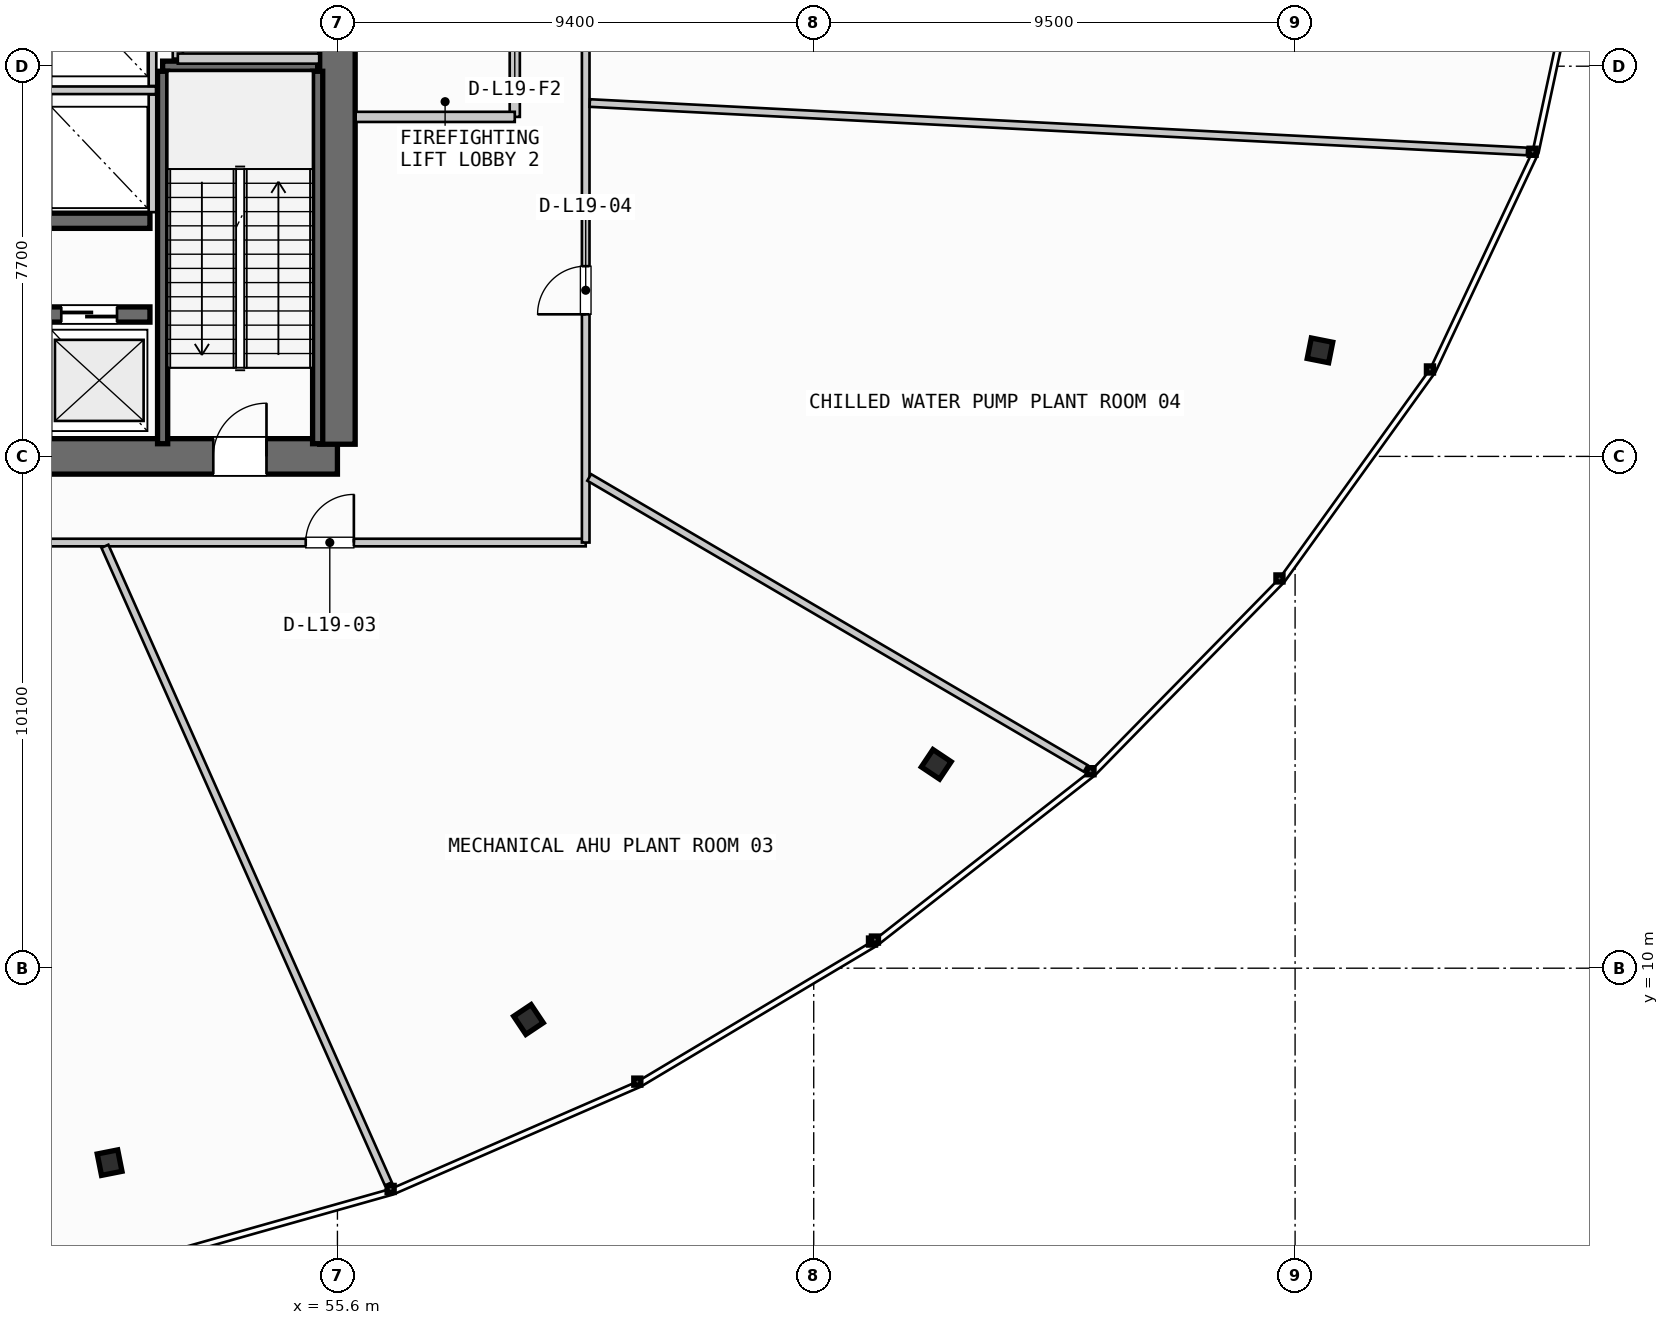
"""IFC4 building model, lengths in metres.
Left out: names, types, materials, properties, quantities, classifications, styles, units other than length and angle.
Written with IfcOpenShell. Run it as: python <this file> out.ifc"""

import sys

from ifc_helpers import new_model, si_unit, direction, frame, frame_2d, origin, origin_2d, place, context, subcontext, project, spatial, rectangle, i_section, extrude, source, transform, mapped, element, fill, save


model = new_model("IFC4")
c1 = context("Model", 3, precision=1e-05, world=origin(), true_north=direction((0.0, 1.0)))
c2 = subcontext(c1, "Body", "Model", "MODEL_VIEW")
j1 = project(units=[si_unit("LENGTHUNIT", "METRE"), si_unit("PLANEANGLEUNIT", "RADIAN")], contexts=[c1])
p1 = place(None, origin())
s1 = spatial("IfcSite", under=j1, at=p1, CompositionType="ELEMENT")
p2 = place(p1, origin())
s2 = spatial("IfcBuilding", under=s1, at=p2, CompositionType="ELEMENT")
p3 = place(p2, frame((0.0, 0.0, 80.4)))
s3 = spatial("IfcBuildingStorey", under=s2, at=p3, CompositionType="ELEMENT", Elevation=80.4)
p4 = place(p3, frame((38.0, 20.1, 0.0), z_axis=(0.0, 0.0, 1.0), x_axis=(1.0, 0.0, 0.0)))
e1 = element("IfcWall", 1, at=p4, inside=s3, PredefinedType="SHEAR", context=c2, shape_type="SweptSolid", body=[
    extrude(rectangle(XDim=17.6, YDim=0.7, at=frame_2d((8.8, 0.0))), origin(), (0.0, 0.0, 1.0), 4.76),
])
p5 = place(p4, frame((1.4, 0.0, 0.0)))
e2 = element("IfcOpeningElement", 2, at=p5, cuts=e1, PredefinedType="OPENING", context=c2, shape_type="SweptSolid", body=[
    extrude(rectangle(XDim=1.05, YDim=2.15, at=frame_2d((0.525, 1.075))), frame((0.0, 0.36, 0.0), z_axis=(0.0, -1.0, 0.0), x_axis=(1.0, 0.0, 0.0)), (0.0, 0.0, 1.0), 0.72),
])
p6 = place(p4, frame((15.15, 0.0, 0.0)))
e3 = element("IfcOpeningElement", 3, at=p6, cuts=e1, PredefinedType="OPENING", context=c2, shape_type="SweptSolid", body=[
    extrude(rectangle(XDim=1.05, YDim=2.15, at=frame_2d((0.525, 1.075))), frame((0.0, 0.36, 0.0), z_axis=(0.0, -1.0, 0.0), x_axis=(1.0, 0.0, 0.0)), (0.0, 0.0, 1.0), 0.72),
])
p7 = place(p3, frame((55.6, 20.34, 0.0), z_axis=(0.0, 0.0, 1.0), x_axis=(0.0, 1.0, 0.0)))
e4 = element("IfcWall", 4, at=p7, inside=s3, PredefinedType="SHEAR", context=c2, shape_type="SweptSolid", body=[
    extrude(rectangle(XDim=14.92, YDim=0.7, at=frame_2d((7.46, 0.0))), origin(), (0.0, 0.0, 1.0), 4.76),
])
p8 = place(p7, frame((12.71, 0.0, 0.0)))
e5 = element("IfcOpeningElement", 5, at=p8, cuts=e4, PredefinedType="OPENING", context=c2, shape_type="SweptSolid", body=[
    extrude(rectangle(XDim=1.05, YDim=2.15, at=frame_2d((0.525, 1.075))), frame((0.0, 0.36, 0.0), z_axis=(0.0, -1.0, 0.0), x_axis=(1.0, 0.0, 0.0)), (0.0, 0.0, 1.0), 0.72),
])
p9 = place(p7, frame((8.61, 0.0, 0.0)))
e6 = element("IfcOpeningElement", 6, at=p9, cuts=e4, PredefinedType="OPENING", context=c2, shape_type="SweptSolid", body=[
    extrude(rectangle(XDim=1.1, YDim=2.2, at=frame_2d((0.55, 1.1))), frame((0.0, 0.36, 0.0), z_axis=(0.0, -1.0, 0.0), x_axis=(1.0, 0.0, 0.0)), (0.0, 0.0, 1.0), 0.72),
])
p10 = place(p3, frame((47.65, 22.9, 0.0), z_axis=(0.0, 0.0, 1.0), x_axis=(1.0, 0.0, 0.0)))
e7 = element("IfcWall", 7, at=p10, inside=s3, PredefinedType="SHEAR", context=c2, shape_type="SweptSolid", body=[
    extrude(rectangle(XDim=4.25, YDim=0.3, at=frame_2d((2.125, 0.0))), origin(), (0.0, 0.0, 1.0), 4.76),
])
p11 = place(p10, frame((0.45, 0.0, 0.0)))
e8 = element("IfcOpeningElement", 8, at=p11, cuts=e7, PredefinedType="OPENING", context=c2, shape_type="SweptSolid", body=[
    extrude(rectangle(XDim=1.1, YDim=2.2, at=frame_2d((0.55, 1.1))), frame((0.0, 0.16, 0.0), z_axis=(0.0, -1.0, 0.0), x_axis=(1.0, 0.0, 0.0)), (0.0, 0.0, 1.0), 0.32),
])
p12 = place(p10, frame((2.5, 0.0, 0.0)))
e9 = element("IfcOpeningElement", 9, at=p12, cuts=e7, PredefinedType="OPENING", context=c2, shape_type="SweptSolid", body=[
    extrude(rectangle(XDim=1.1, YDim=2.2, at=frame_2d((0.55, 1.1))), frame((0.0, 0.16, 0.0), z_axis=(0.0, -1.0, 0.0), x_axis=(1.0, 0.0, 0.0)), (0.0, 0.0, 1.0), 0.32),
])
p13 = place(p3, frame((47.65, 24.75, 0.0), z_axis=(0.0, 0.0, 1.0), x_axis=(1.0, 0.0, 0.0)))
e10 = element("IfcWall", 10, at=p13, inside=s3, PredefinedType="SHEAR", context=c2, shape_type="SweptSolid", body=[
    extrude(rectangle(XDim=4.25, YDim=0.3, at=frame_2d((2.125, 0.0))), origin(), (0.0, 0.0, 1.0), 4.76),
])
m1 = source(origin(), c2, "Body", "SweptSolid", [
    extrude(i_section(OverallWidth=0.412, OverallDepth=0.431, WebThickness=0.042, FlangeThickness=0.068, FilletRadius=0.015, at=origin_2d()), origin(), (0.0, 0.0, 1.0), 4.76),
])
for number, where, z_axis, x_axis in (
    (11, (51.104, 6.163, 0.0), (0.0, 0.0, 1.0), (0.195, -0.981, 0.0)),
    (12, (59.37, 8.987, 0.0), (0.0, 0.0, 1.0), (0.556, -0.831, 0.0)),
    (13, (67.418, 14.023, 0.0), (0.0, 0.0, 1.0), (0.831, -0.556, 0.0)),
    (14, (74.991, 22.192, 0.0), (0.0, 0.0, 1.0), (0.981, -0.195, 0.0)),
):
    element("IfcColumn", number, at=place(p3, frame(where, z_axis=z_axis, x_axis=x_axis)), inside=s3, PredefinedType="COLUMN", context=c2, shape_type="MappedRepresentation", body=[
        mapped(m1, transform((0.0, 0.0, 0.0), scale=1.0)),
    ])
p14 = place(p3, frame((52.15, 27.8, 0.0), z_axis=(0.0, 0.0, 1.0), x_axis=(1.0, 0.0, 0.0)))
e15 = element("IfcWall", 15, at=p14, inside=s3, PredefinedType="SHEAR", context=c2, shape_type="SweptSolid", body=[
    extrude(rectangle(XDim=3.06, YDim=0.2, at=frame_2d((1.53, 0.0))), origin(), (0.0, 0.0, 1.0), 4.76),
])
for number, where, z_axis, x_axis in (
    (16, (55.21, 27.7, 0.0), (0.0, 0.0, 1.0), (0.0, -1.0, 0.0)),
    (17, (52.15, 20.35, 0.0), (0.0, 0.0, 1.0), (0.0, 1.0, 0.0)),
):
    element("IfcWall", number, at=place(p3, frame(where, z_axis=z_axis, x_axis=x_axis)), inside=s3, PredefinedType="SHEAR", context=c2, shape_type="SweptSolid", body=[
        extrude(rectangle(XDim=7.35, YDim=0.2, at=frame_2d((3.675, 0.0))), origin(), (0.0, 0.0, 1.0), 4.76),
    ])
p15 = place(p3, frame((52.45, 27.95, 0.0), z_axis=(0.0, 0.0, 1.0), x_axis=(0.0, 1.0, 0.0)))
e18 = element("IfcWall", 18, at=p15, inside=s3, PredefinedType="PARTITIONING", context=c2, shape_type="SweptSolid", body=[
    extrude(rectangle(XDim=3.1, YDim=0.2, at=frame_2d((1.55, 0.0))), origin(), (0.0, 0.0, 1.0), 2.335),
])
p16 = place(p3, frame((52.45, 27.95, 0.0), z_axis=(0.0, 0.0, 1.0), x_axis=(1.0, 0.0, 0.0)))
e19 = element("IfcWall", 19, at=p16, inside=s3, PredefinedType="PARTITIONING", context=c2, shape_type="SweptSolid", body=[
    extrude(rectangle(XDim=2.79, YDim=0.2, at=frame_2d((1.395, 0.0))), origin(), (0.0, 0.0, 1.0), 2.335),
])
p17 = place(p3, frame((59.1, 26.8, 0.0), z_axis=(0.0, 0.0, 1.0), x_axis=(0.0, 1.0, 0.0)))
e20 = element("IfcWall", 20, at=p17, inside=s3, PredefinedType="PARTITIONING", context=c2, shape_type="SweptSolid", body=[
    extrude(rectangle(XDim=4.4, YDim=0.2, at=frame_2d((2.2, 0.0))), origin(), (0.0, 0.0, 1.0), 2.335),
])
p18 = place(p17, frame((1.65, 0.0, 0.0)))
e21 = element("IfcOpeningElement", 21, at=p18, cuts=e20, PredefinedType="OPENING", context=c2, shape_type="SweptSolid", body=[
    extrude(rectangle(XDim=1.05, YDim=2.15, at=frame_2d((0.525, 1.075))), frame((0.0, 0.11, 0.0), z_axis=(0.0, -1.0, 0.0), x_axis=(1.0, 0.0, 0.0)), (0.0, 0.0, 1.0), 0.22),
])
p19 = place(p3, frame((55.96, 26.8, 0.0), z_axis=(0.0, 0.0, 1.0), x_axis=(1.0, 0.0, 0.0)))
e22 = element("IfcWall", 22, at=p19, inside=s3, PredefinedType="PARTITIONING", context=c2, shape_type="SweptSolid", body=[
    extrude(rectangle(XDim=3.14, YDim=0.2, at=frame_2d((1.57, 0.0))), origin(), (0.0, 0.0, 1.0), 2.335),
])
p20 = place(p3, frame((47.7, 27.325, 0.0), z_axis=(0.0, 0.0, 1.0), x_axis=(1.0, 0.0, 0.0)))
e23 = element("IfcWall", 23, at=p20, inside=s3, PredefinedType="PARTITIONING", context=c2, shape_type="SweptSolid", body=[
    extrude(rectangle(XDim=4.32, YDim=0.15, at=frame_2d((2.16, 0.0))), origin(), (0.0, 0.0, 1.0), 2.335),
])
p21 = place(p3, frame((51.95, 24.92, 0.0), z_axis=(0.0, 0.0, 1.0), x_axis=(0.0, 1.0, 0.0)))
e24 = element("IfcWall", 24, at=p21, inside=s3, PredefinedType="PARTITIONING", context=c2, shape_type="SweptSolid", body=[
    extrude(rectangle(XDim=2.32, YDim=0.15, at=frame_2d((1.16, 0.0))), origin(), (0.0, 0.0, 1.0), 2.335),
])
p22 = place(p3, frame((51.95, 27.41, 0.0), z_axis=(0.0, 0.0, 1.0), x_axis=(0.0, 1.0, 0.0)))
e25 = element("IfcWall", 25, at=p22, inside=s3, PredefinedType="PARTITIONING", context=c2, shape_type="SweptSolid", body=[
    extrude(rectangle(XDim=2.27, YDim=0.15, at=frame_2d((1.135, 0.0))), origin(), (0.0, 0.0, 1.0), 2.335),
])
p23 = place(p3, frame((33.1, 18.4, 0.0), z_axis=(0.0, 0.0, 1.0), x_axis=(1.0, 0.0, 0.0)))
e26 = element("IfcWall", 26, at=p23, inside=s3, PredefinedType="PARTITIONING", context=c2, shape_type="SweptSolid", body=[
    extrude(rectangle(XDim=27.4, YDim=0.15, at=frame_2d((13.7, 0.0))), origin(), (0.0, 0.0, 1.0), 2.335),
])
p24 = place(p23, frame((2.398, 0.0, 0.0)))
e27 = element("IfcOpeningElement", 27, at=p24, cuts=e26, PredefinedType="OPENING", context=c2, shape_type="SweptSolid", body=[
    extrude(rectangle(XDim=0.95, YDim=2.15, at=frame_2d((0.475, 1.075))), frame((0.0, 0.085, 0.0), z_axis=(0.0, -1.0, 0.0), x_axis=(1.0, 0.0, 0.0)), (0.0, 0.0, 1.0), 0.17),
])
p25 = place(p23, frame((10.77, 0.0, 0.0)))
e28 = element("IfcOpeningElement", 28, at=p25, cuts=e26, PredefinedType="OPENING", context=c2, shape_type="SweptSolid", body=[
    extrude(rectangle(XDim=0.95, YDim=2.15, at=frame_2d((0.475, 1.075))), frame((0.0, 0.085, 0.0), z_axis=(0.0, -1.0, 0.0), x_axis=(1.0, 0.0, 0.0)), (0.0, 0.0, 1.0), 0.17),
])
p26 = place(p23, frame((21.875, 0.0, 0.0)))
e29 = element("IfcOpeningElement", 29, at=p26, cuts=e26, PredefinedType="OPENING", context=c2, shape_type="SweptSolid", body=[
    extrude(rectangle(XDim=0.95, YDim=2.15, at=frame_2d((0.475, 1.075))), frame((0.0, 0.085, 0.0), z_axis=(0.0, -1.0, 0.0), x_axis=(1.0, 0.0, 0.0)), (0.0, 0.0, 1.0), 0.17),
])
p27 = place(p3, frame((60.5, 18.4, 0.0), z_axis=(0.0, 0.0, 1.0), x_axis=(0.0, 1.0, 0.0)))
e30 = element("IfcWall", 30, at=p27, inside=s3, PredefinedType="PARTITIONING", context=c2, shape_type="SweptSolid", body=[
    extrude(rectangle(XDim=18.8, YDim=0.15, at=frame_2d((9.4, 0.0))), origin(), (0.0, 0.0, 1.0), 2.335),
])
p28 = place(p27, frame((4.504, 0.0, 0.0)))
e31 = element("IfcOpeningElement", 31, at=p28, cuts=e30, PredefinedType="OPENING", context=c2, shape_type="SweptSolid", body=[
    extrude(rectangle(XDim=0.95, YDim=2.15, at=frame_2d((0.475, 1.075))), frame((0.0, 0.085, 0.0), z_axis=(0.0, -1.0, 0.0), x_axis=(1.0, 0.0, 0.0)), (0.0, 0.0, 1.0), 0.17),
])
p29 = place(p27, frame((11.983, 0.0, 0.0)))
e32 = element("IfcOpeningElement", 32, at=p29, cuts=e30, PredefinedType="OPENING", context=c2, shape_type="SweptSolid", body=[
    extrude(rectangle(XDim=0.95, YDim=2.15, at=frame_2d((0.475, 1.075))), frame((0.0, 0.085, 0.0), z_axis=(0.0, -1.0, 0.0), x_axis=(1.0, 0.0, 0.0)), (0.0, 0.0, 1.0), 0.17),
])
p30 = place(p3, frame((51.011, 18.327, 0.0), z_axis=(0.0, 0.0, 1.0), x_axis=(0.406247031728, -0.913763289486, 0.0)))
e33 = element("IfcWall", 33, at=p30, inside=s3, PredefinedType="PARTITIONING", context=c2, shape_type="SweptSolid", body=[
    extrude(rectangle(XDim=13.771, YDim=0.15, at=frame_2d((6.885, 0.0))), origin(), (0.0, 0.0, 1.0), 2.335),
])
p31 = place(p3, frame((60.569, 19.685, 0.0), z_axis=(0.0, 0.0, 1.0), x_axis=(0.862760384017, -0.505613013847, 0.0)))
e34 = element("IfcWall", 34, at=p31, inside=s3, PredefinedType="PARTITIONING", context=c2, shape_type="SweptSolid", body=[
    extrude(rectangle(XDim=11.356, YDim=0.15, at=frame_2d((5.678, 0.0))), origin(), (0.0, 0.0, 1.0), 2.335),
])
p32 = place(p3, frame((60.58, 27.073, 0.0), z_axis=(0.0, 0.0, 1.0), x_axis=(0.998666262496, -0.051630380125, 0.0)))
e35 = element("IfcWall", 35, at=p32, inside=s3, PredefinedType="PARTITIONING", context=c2, shape_type="SweptSolid", body=[
    extrude(rectangle(XDim=18.522, YDim=0.15, at=frame_2d((9.261, 0.0))), origin(), (0.0, 0.0, 1.0), 2.335),
])
m2 = source(origin(), c2, "Body", "SweptSolid", [
    extrude(rectangle(XDim=1.05, YDim=2.15, at=frame_2d((0.525, 1.075))), frame((0.0, 0.025, 0.0), z_axis=(0.0, -1.0, 0.0), x_axis=(1.0, 0.0, 0.0)), (0.0, 0.0, 1.0), 0.05),
])
p33 = place(p6, origin())
e36 = element("IfcDoor", 36, at=p33, inside=s3, OperationType="SINGLE_SWING_RIGHT", PredefinedType="DOOR", context=c2, shape_type="MappedRepresentation", body=[
    mapped(m2, transform((0.0, 0.0, 0.0), scale=1.0)),
])
fill(e3, e36)
m3 = source(origin(), c2, "Body", "SweptSolid", [
    extrude(rectangle(XDim=1.1, YDim=2.2, at=frame_2d((0.55, 1.1))), frame((0.0, 0.025, 0.0), z_axis=(0.0, -1.0, 0.0), x_axis=(1.0, 0.0, 0.0)), (0.0, 0.0, 1.0), 0.05),
])
p34 = place(p12, origin())
e37 = element("IfcDoor", 37, at=p34, inside=s3, OperationType="SLIDING_TO_LEFT", PredefinedType="DOOR", context=c2, shape_type="MappedRepresentation", body=[
    mapped(m3, transform((0.0, 0.0, 0.0), scale=1.0)),
])
fill(e9, e37)
m4 = source(origin(), c2, "Body", "SweptSolid", [
    extrude(rectangle(XDim=0.95, YDim=2.15, at=frame_2d((0.475, 1.075))), frame((0.0, 0.025, 0.0), z_axis=(0.0, -1.0, 0.0), x_axis=(1.0, 0.0, 0.0)), (0.0, 0.0, 1.0), 0.05),
])
p35 = place(p26, origin())
e38 = element("IfcDoor", 38, at=p35, inside=s3, OperationType="SINGLE_SWING_RIGHT", PredefinedType="DOOR", context=c2, shape_type="MappedRepresentation", body=[
    mapped(m4, transform((0.0, 0.0, 0.0), scale=1.0)),
])
fill(e29, e38)
p36 = place(p28, origin())
e39 = element("IfcDoor", 39, at=p36, inside=s3, OperationType="SINGLE_SWING_LEFT", PredefinedType="DOOR", context=c2, shape_type="MappedRepresentation", body=[
    mapped(m4, transform((0.0, 0.0, 0.0), scale=1.0)),
])
fill(e31, e39)
save(model, sys.argv[1])
